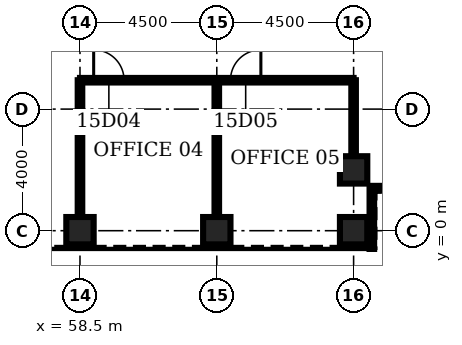
"""IFC4 building model, lengths in metres.
Left out: names, types, materials, properties, quantities, classifications, styles, units other than length and angle.
Written with IfcOpenShell. Run it as: python <this file> out.ifc"""

import sys

from ifc_helpers import new_model, si_unit, direction, frame, frame_2d, origin, origin_2d, place, context, subcontext, project, spatial, rectangle, hollow_rectangle, extrude, element, fill, save


model = new_model("IFC4")
c1 = context("Model", 3, precision=1e-05, world=origin(), true_north=direction((0.0, 1.0)))
c2 = subcontext(c1, "Body", "Model", "MODEL_VIEW")
j1 = project(units=[si_unit("LENGTHUNIT", "METRE"), si_unit("PLANEANGLEUNIT", "RADIAN")], contexts=[c1])
p1 = place(None, origin())
s1 = spatial("IfcSite", under=j1, at=p1, CompositionType="ELEMENT")
p2 = place(p1, origin())
s2 = spatial("IfcBuilding", under=s1, at=p2, CompositionType="ELEMENT")
p3 = place(p2, frame((0.0, 0.0, 72.5)))
s3 = spatial("IfcBuildingStorey", under=s2, at=p3, CompositionType="ELEMENT", Elevation=72.5)
for number, where, z_axis, x_axis in (
    (1, (58.5, 0.0, 0.0), (0.0, 0.0, 1.0), (0.0, 1.0, 0.0)),
    (2, (63.0, 0.0, 0.0), (0.0, 0.0, 1.0), (0.0, 1.0, 0.0)),
    (3, (67.5, 0.0, 0.0), (0.0, 0.0, 1.0), (0.0, 1.0, 0.0)),
    (4, (67.5, 2.0, 0.0), (0.0, 0.0, 1.0), (0.0, 1.0, 0.0)),
):
    element("IfcColumn", number, at=place(p3, frame(where, z_axis=z_axis, x_axis=x_axis)), inside=s3, PredefinedType="COLUMN", context=c2, shape_type="SweptSolid", body=[
        extrude(hollow_rectangle(XDim=0.9, YDim=0.9, WallThickness=0.12, at=origin_2d()), origin(), (0.0, 0.0, 1.0), 4.5),
    ])
p4 = place(p3, frame((58.5, 4.95, 0.0), z_axis=(0.0, 0.0, 1.0), x_axis=(1.0, 0.0, 0.0)))
e5 = element("IfcWall", 5, at=p4, inside=s3, PredefinedType="PARTITIONING", context=c2, shape_type="SweptSolid", body=[
    extrude(rectangle(XDim=9.0, YDim=0.15, at=frame_2d((4.5, 0.0))), origin(), (0.0, 0.0, 1.0), 3.0),
])
p5 = place(p4, frame((0.45, 0.0, 0.0)))
e6 = element("IfcOpeningElement", 6, at=p5, cuts=e5, PredefinedType="OPENING", context=c2, shape_type="SweptSolid", body=[
    extrude(rectangle(XDim=1.0, YDim=2.1, at=frame_2d((0.5, 1.05))), frame((0.0, 0.085, 0.0), z_axis=(0.0, -1.0, 0.0), x_axis=(1.0, 0.0, 0.0)), (0.0, 0.0, 1.0), 0.17),
])
p6 = place(p4, frame((4.95, 0.0, 0.0)))
e7 = element("IfcOpeningElement", 7, at=p6, cuts=e5, PredefinedType="OPENING", context=c2, shape_type="SweptSolid", body=[
    extrude(rectangle(XDim=1.0, YDim=2.1, at=frame_2d((0.5, 1.05))), frame((0.0, 0.085, 0.0), z_axis=(0.0, -1.0, 0.0), x_axis=(1.0, 0.0, 0.0)), (0.0, 0.0, 1.0), 0.17),
])
for number, where, z_axis, x_axis in (
    (8, (58.5, 0.45, 0.0), (0.0, 0.0, 1.0), (0.0, 1.0, 0.0)),
    (9, (63.0, 0.45, 0.0), (0.0, 0.0, 1.0), (0.0, 1.0, 0.0)),
):
    element("IfcWall", number, at=place(p3, frame(where, z_axis=z_axis, x_axis=x_axis)), inside=s3, PredefinedType="PARTITIONING", context=c2, shape_type="SweptSolid", body=[
        extrude(rectangle(XDim=4.5, YDim=0.15, at=frame_2d((2.25, 0.0))), origin(), (0.0, 0.0, 1.0), 3.0),
    ])
p7 = place(p3, frame((67.5, 2.45, 0.0), z_axis=(0.0, 0.0, 1.0), x_axis=(0.0, 1.0, 0.0)))
e10 = element("IfcWall", 10, at=p7, inside=s3, PredefinedType="PARTITIONING", context=c2, shape_type="SweptSolid", body=[
    extrude(rectangle(XDim=2.5, YDim=0.15, at=frame_2d((1.25, 0.0))), origin(), (0.0, 0.0, 1.0), 3.0),
])
p8 = place(p3, frame((68.1, -0.6, 0.0), z_axis=(0.0, 0.0, 1.0), x_axis=(0.0, 1.0, 0.0)))
e11 = element("IfcWall", 11, at=p8, inside=s3, PredefinedType="ELEMENTEDWALL", context=c2, shape_type="SweptSolid", body=[
    extrude(rectangle(XDim=2.0, YDim=0.15, at=frame_2d((1.0, 0.0))), origin(), (0.0, 0.0, 1.0), 4.32),
])
p9 = place(p3, frame((68.1, 1.4, 0.0), z_axis=(0.0, 0.0, 1.0), x_axis=(1.0, 0.0, 0.0)))
e12 = element("IfcWall", 12, at=p9, inside=s3, PredefinedType="ELEMENTEDWALL", context=c2, shape_type="SweptSolid", body=[
    extrude(rectangle(XDim=2.25, YDim=0.15, at=frame_2d((1.125, 0.0))), origin(), (0.0, 0.0, 1.0), 4.32),
])
p10 = place(p5, origin())
e13 = element("IfcDoor", 13, at=p10, inside=s3, OperationType="SINGLE_SWING_LEFT", PredefinedType="DOOR", context=c2, shape_type="SweptSolid", body=[
    extrude(rectangle(XDim=1.0, YDim=2.1, at=frame_2d((0.5, 1.05))), frame((0.0, 0.025, 0.0), z_axis=(0.0, -1.0, 0.0), x_axis=(1.0, 0.0, 0.0)), (0.0, 0.0, 1.0), 0.05),
])
fill(e6, e13)
p11 = place(p6, origin())
e14 = element("IfcDoor", 14, at=p11, inside=s3, OperationType="SINGLE_SWING_RIGHT", PredefinedType="DOOR", context=c2, shape_type="SweptSolid", body=[
    extrude(rectangle(XDim=1.0, YDim=2.1, at=frame_2d((0.5, 1.05))), frame((0.0, 0.025, 0.0), z_axis=(0.0, -1.0, 0.0), x_axis=(1.0, 0.0, 0.0)), (0.0, 0.0, 1.0), 0.05),
])
fill(e7, e14)
save(model, sys.argv[1])
